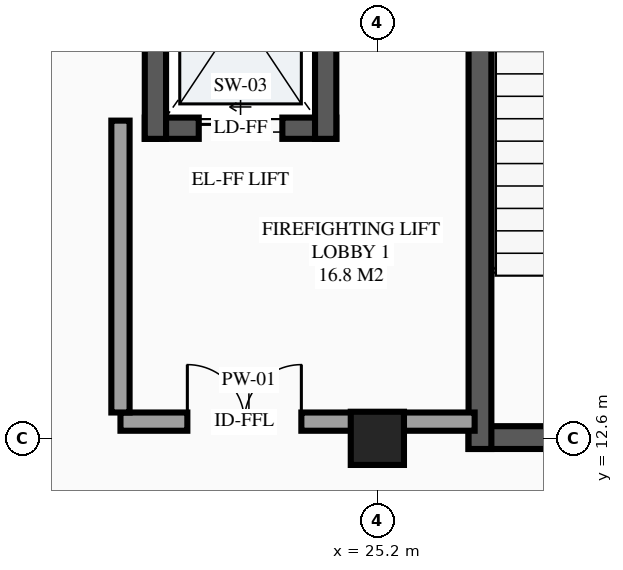
"""IFC4 building model, lengths in metres.
Left out: names, types, materials, properties, quantities, classifications, styles, units other than length and angle.
Written with IfcOpenShell. Run it as: python <this file> out.ifc"""

import sys

from ifc_helpers import new_model, si_unit, direction, frame, frame_2d, origin, origin_2d, place, context, subcontext, project, spatial, rectangle, extrude, element, fill, save


model = new_model("IFC4")
c1 = context("Model", 3, precision=1e-05, world=origin(), true_north=direction((0.0, 1.0)))
c2 = subcontext(c1, "Body", "Model", "MODEL_VIEW")
j1 = project(units=[si_unit("LENGTHUNIT", "METRE"), si_unit("PLANEANGLEUNIT", "RADIAN")], contexts=[c1])
p1 = place(None, origin())
s1 = spatial("IfcSite", under=j1, at=p1, CompositionType="ELEMENT")
p2 = place(p1, origin())
s2 = spatial("IfcBuilding", under=s1, at=p2, CompositionType="ELEMENT")
p3 = place(p2, frame((0.0, 0.0, 14.1)))
s3 = spatial("IfcBuildingStorey", under=s2, at=p3, CompositionType="ELEMENT", Elevation=14.1)
p4 = place(p3, frame((25.2, 12.6, 0.0), z_axis=(0.0, 0.0, 1.0), x_axis=(1.0, 0.0, 0.0)))
e1 = element("IfcColumn", 1, at=p4, inside=s3, PredefinedType="COLUMN", context=c2, shape_type="SweptSolid", body=[
    extrude(rectangle(XDim=0.7, YDim=0.7, at=origin_2d()), origin(), (0.0, 0.0, 1.0), 4.2),
])
p5 = place(p3, frame((22.14, 16.68, 0.0), z_axis=(0.0, 0.0, 1.0), x_axis=(1.0, 0.0, 0.0)))
e2 = element("IfcWall", 2, at=p5, inside=s3, PredefinedType="SHEAR", context=c2, shape_type="SweptSolid", body=[
    extrude(rectangle(XDim=2.52, YDim=0.28, at=frame_2d((1.26, 0.0))), origin(), (0.0, 0.0, 1.0), 4.2),
])
p6 = place(p5, frame((0.71, 0.0, 0.0)))
e3 = element("IfcOpeningElement", 3, at=p6, cuts=e2, PredefinedType="OPENING", context=c2, shape_type="SweptSolid", body=[
    extrude(rectangle(XDim=1.1, YDim=2.2, at=frame_2d((0.55, 1.1))), frame((0.0, 0.15, 0.0), z_axis=(0.0, -1.0, 0.0), x_axis=(1.0, 0.0, 0.0)), (0.0, 0.0, 1.0), 0.3),
])
for number, where, z_axis, x_axis in (
    (4, (24.52, 16.54, 0.0), (0.0, 0.0, 1.0), (0.0, 1.0, 0.0)),
    (5, (22.28, 19.86, 0.0), (0.0, 0.0, 1.0), (0.0, -1.0, 0.0)),
):
    element("IfcWall", number, at=place(p3, frame(where, z_axis=z_axis, x_axis=x_axis)), inside=s3, PredefinedType="SHEAR", context=c2, shape_type="SweptSolid", body=[
        extrude(rectangle(XDim=3.32, YDim=0.28, at=frame_2d((1.66, 0.0))), origin(), (0.0, 0.0, 1.0), 4.2),
    ])
p7 = place(p3, frame((26.4, 12.61, 0.0), z_axis=(0.0, 0.0, 1.0), x_axis=(1.0, 0.0, 0.0)))
e6 = element("IfcWall", 6, at=p7, inside=s3, PredefinedType="SHEAR", context=c2, shape_type="SweptSolid", body=[
    extrude(rectangle(XDim=5.2, YDim=0.3, at=frame_2d((2.6, 0.0))), origin(), (0.0, 0.0, 1.0), 4.2),
])
p8 = place(p7, frame((2.025, 0.0, 0.0)))
e7 = element("IfcOpeningElement", 7, at=p8, cuts=e6, PredefinedType="OPENING", context=c2, shape_type="SweptSolid", body=[
    extrude(rectangle(XDim=1.15, YDim=2.15, at=frame_2d((0.575, 1.075))), frame((0.0, 0.16, 0.0), z_axis=(0.0, -1.0, 0.0), x_axis=(1.0, 0.0, 0.0)), (0.0, 0.0, 1.0), 0.32),
])
p9 = place(p3, frame((26.55, 21.3, 0.0), z_axis=(0.0, 0.0, 1.0), x_axis=(0.0, -1.0, 0.0)))
e8 = element("IfcWall", 8, at=p9, inside=s3, PredefinedType="SHEAR", context=c2, shape_type="SweptSolid", body=[
    extrude(rectangle(XDim=8.84, YDim=0.3, at=frame_2d((4.42, 0.0))), origin(), (0.0, 0.0, 1.0), 4.2),
])
p10 = place(p3, frame((21.82, 12.82, 0.0), z_axis=(0.0, 0.0, 1.0), x_axis=(1.0, 0.0, 0.0)))
e9 = element("IfcWall", 9, at=p10, inside=s3, PredefinedType="PARTITIONING", context=c2, shape_type="SweptSolid", body=[
    extrude(rectangle(XDim=3.38, YDim=0.24, at=frame_2d((1.69, 0.0))), origin(), (0.0, 0.0, 1.0), 3.05),
])
p11 = place(p10, frame((0.88, 0.0, 0.0)))
e10 = element("IfcOpeningElement", 10, at=p11, cuts=e9, PredefinedType="OPENING", context=c2, shape_type="SweptSolid", body=[
    extrude(rectangle(XDim=1.5, YDim=2.15, at=frame_2d((0.75, 1.075))), frame((0.0, 0.13, 0.0), z_axis=(0.0, -1.0, 0.0), x_axis=(1.0, 0.0, 0.0)), (0.0, 0.0, 1.0), 0.26),
])
p12 = place(p3, frame((21.82, 12.94, 0.0), z_axis=(0.0, 0.0, 1.0), x_axis=(0.0, 1.0, 0.0)))
e11 = element("IfcWall", 11, at=p12, inside=s3, PredefinedType="PARTITIONING", context=c2, shape_type="SweptSolid", body=[
    extrude(rectangle(XDim=3.84, YDim=0.24, at=frame_2d((1.92, 0.0))), origin(), (0.0, 0.0, 1.0), 3.895),
])
p13 = place(p3, frame((25.2, 12.82, 0.0), z_axis=(0.0, 0.0, 1.0), x_axis=(1.0, 0.0, 0.0)))
e12 = element("IfcWall", 12, at=p13, inside=s3, PredefinedType="PARTITIONING", context=c2, shape_type="SweptSolid", body=[
    extrude(rectangle(XDim=1.28, YDim=0.24, at=frame_2d((0.64, 0.0))), origin(), (0.0, 0.0, 1.0), 3.15),
])
p14 = place(p6, origin())
e13 = element("IfcDoor", 13, at=p14, inside=s3, OperationType="SLIDING_TO_LEFT", PredefinedType="DOOR", context=c2, shape_type="SweptSolid", body=[
    extrude(rectangle(XDim=1.1, YDim=2.2, at=frame_2d((0.55, 1.1))), frame((0.0, 0.025, 0.0), z_axis=(0.0, -1.0, 0.0), x_axis=(1.0, 0.0, 0.0)), (0.0, 0.0, 1.0), 0.05),
])
fill(e3, e13)
p15 = place(p11, origin())
e14 = element("IfcDoor", 14, at=p15, inside=s3, OperationType="DOUBLE_DOOR_SINGLE_SWING", PredefinedType="DOOR", context=c2, shape_type="SweptSolid", body=[
    extrude(rectangle(XDim=1.5, YDim=2.15, at=frame_2d((0.75, 1.075))), frame((0.0, 0.025, 0.0), z_axis=(0.0, -1.0, 0.0), x_axis=(1.0, 0.0, 0.0)), (0.0, 0.0, 1.0), 0.05),
])
fill(e10, e14)
save(model, sys.argv[1])
